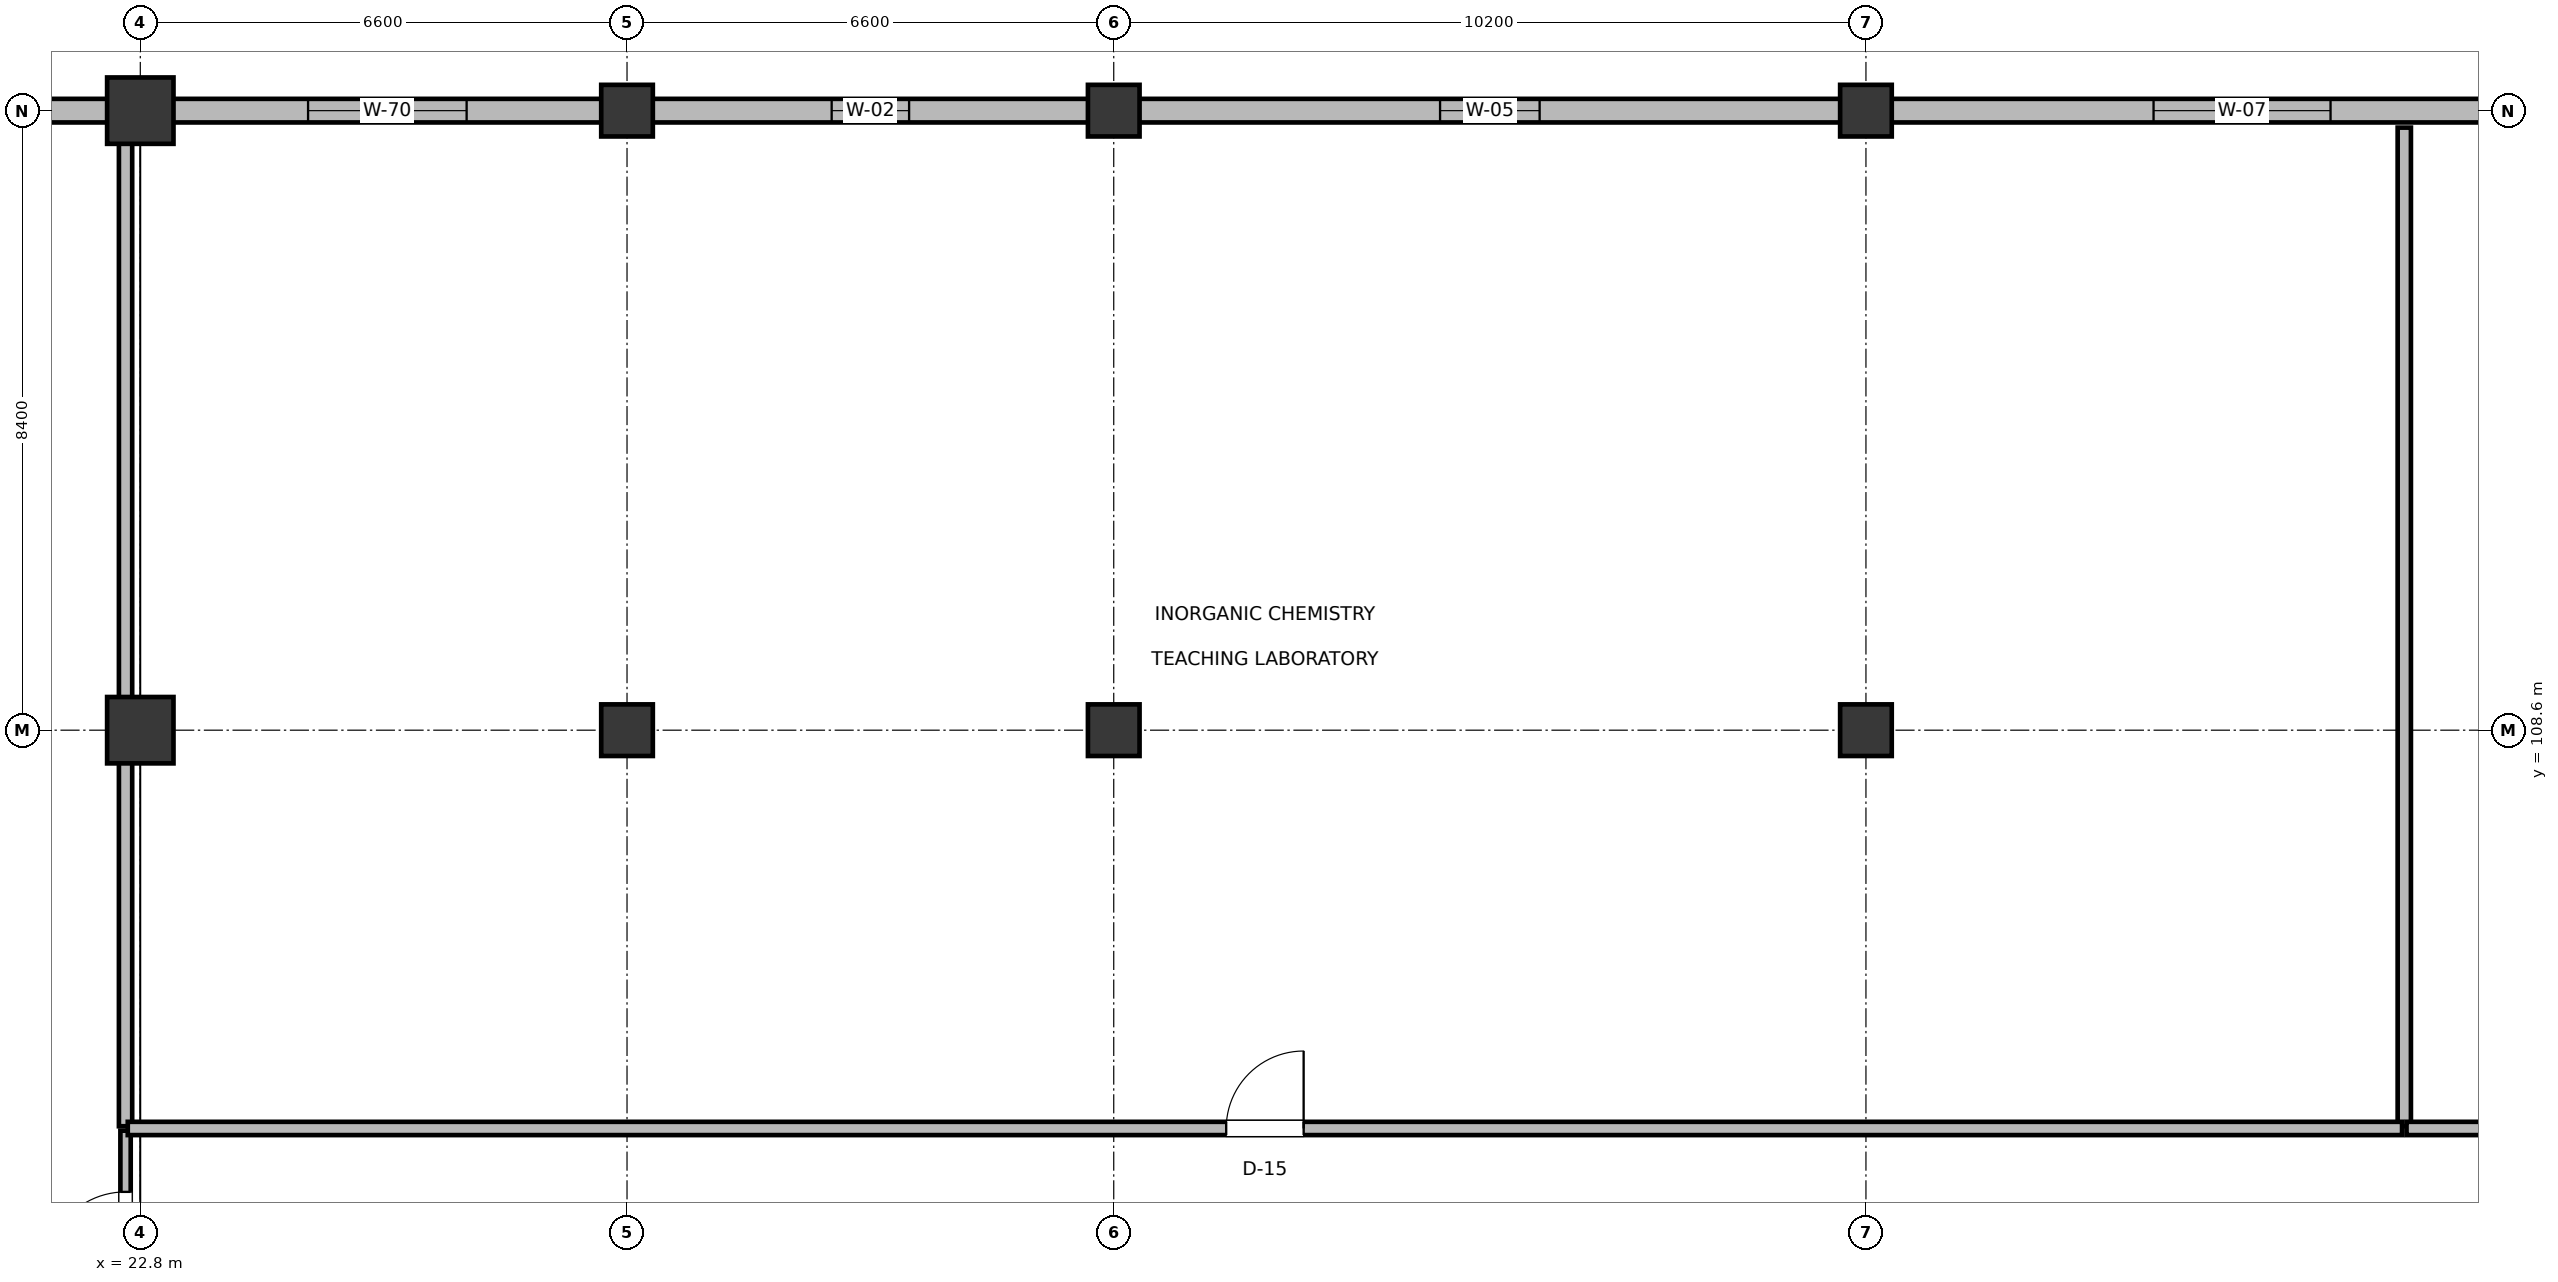
"""IFC4 building model, lengths in metres.
Left out: names, types, materials, properties, quantities, classifications, styles, units other than length and angle.
Written with IfcOpenShell. Run it as: python <this file> out.ifc"""

import sys

from ifc_helpers import new_model, si_unit, direction, frame, frame_2d, origin, origin_2d, place, context, subcontext, project, spatial, rectangle, extrude, element, fill, save


model = new_model("IFC4")
c1 = context("Model", 3, precision=1e-05, world=origin(), true_north=direction((0.0, 1.0)))
c2 = subcontext(c1, "Body", "Model", "MODEL_VIEW")
j1 = project(units=[si_unit("LENGTHUNIT", "METRE"), si_unit("PLANEANGLEUNIT", "RADIAN")], contexts=[c1])
p1 = place(None, origin())
s1 = spatial("IfcSite", under=j1, at=p1, CompositionType="ELEMENT")
p2 = place(p1, origin())
s2 = spatial("IfcBuilding", under=s1, at=p2, CompositionType="ELEMENT")
p3 = place(p2, frame((0.0, 0.0, 5.4)))
s3 = spatial("IfcBuildingStorey", under=s2, at=p3, CompositionType="ELEMENT", Elevation=5.4)
for number, where, z_axis, x_axis in (
    (1, (22.8, 108.6, 0.0), (0.0, 0.0, 1.0), (1.0, 0.0, 0.0)),
    (2, (22.8, 117.0, 0.0), (0.0, 0.0, 1.0), (1.0, 0.0, 0.0)),
):
    element("IfcColumn", number, at=place(p3, frame(where, z_axis=z_axis, x_axis=x_axis)), inside=s3, PredefinedType="COLUMN", context=c2, shape_type="SweptSolid", body=[
        extrude(rectangle(XDim=0.9, YDim=0.9, at=origin_2d()), origin(), (0.0, 0.0, 1.0), 4.8),
    ])
for number, where, z_axis, x_axis in (
    (3, (29.4, 108.6, 0.0), (0.0, 0.0, 1.0), (1.0, 0.0, 0.0)),
    (4, (29.4, 117.0, 0.0), (0.0, 0.0, 1.0), (1.0, 0.0, 0.0)),
    (5, (36.0, 108.6, 0.0), (0.0, 0.0, 1.0), (1.0, 0.0, 0.0)),
    (6, (36.0, 117.0, 0.0), (0.0, 0.0, 1.0), (1.0, 0.0, 0.0)),
    (7, (46.2, 108.6, 0.0), (0.0, 0.0, 1.0), (1.0, 0.0, 0.0)),
    (8, (46.2, 117.0, 0.0), (0.0, 0.0, 1.0), (1.0, 0.0, 0.0)),
):
    element("IfcColumn", number, at=place(p3, frame(where, z_axis=z_axis, x_axis=x_axis)), inside=s3, PredefinedType="COLUMN", context=c2, shape_type="SweptSolid", body=[
        extrude(rectangle(XDim=0.7, YDim=0.7, at=origin_2d()), origin(), (0.0, 0.0, 1.0), 4.8),
    ])
p4 = place(p3, frame((3.435, 117.0, 0.0), z_axis=(0.0, 0.0, 1.0), x_axis=(1.0, 0.0, 0.0)))
e9 = element("IfcWall", 9, at=p4, inside=s3, PredefinedType="SOLIDWALL", context=c2, shape_type="SweptSolid", body=[
    extrude(rectangle(XDim=18.93, YDim=0.32, at=frame_2d((9.465, 0.0))), origin(), (0.0, 0.0, 1.0), 3.775),
])
p5 = place(p4, frame((8.39, 0.0, 0.95)))
e10 = element("IfcOpeningElement", 10, at=p5, cuts=e9, PredefinedType="OPENING", context=c2, shape_type="SweptSolid", body=[
    extrude(rectangle(XDim=2.15, YDim=1.15, at=frame_2d((1.075, 0.575))), frame((0.0, 0.17, 0.0), z_axis=(0.0, -1.0, 0.0), x_axis=(1.0, 0.0, 0.0)), (0.0, 0.0, 1.0), 0.34),
])
p6 = place(p3, frame((23.235, 117.0, 0.0), z_axis=(0.0, 0.0, 1.0), x_axis=(1.0, 0.0, 0.0)))
e11 = element("IfcWall", 11, at=p6, inside=s3, PredefinedType="SOLIDWALL", context=c2, shape_type="SweptSolid", body=[
    extrude(rectangle(XDim=5.83, YDim=0.32, at=frame_2d((2.915, 0.0))), origin(), (0.0, 0.0, 1.0), 3.845),
])
p7 = place(p6, frame((1.84, 0.0, 0.9)))
e12 = element("IfcOpeningElement", 12, at=p7, cuts=e11, PredefinedType="OPENING", context=c2, shape_type="SweptSolid", body=[
    extrude(rectangle(XDim=2.15, YDim=1.35, at=frame_2d((1.075, 0.675))), frame((0.0, 0.17, 0.0), z_axis=(0.0, -1.0, 0.0), x_axis=(1.0, 0.0, 0.0)), (0.0, 0.0, 1.0), 0.34),
])
p8 = place(p3, frame((29.735, 117.0, 0.0), z_axis=(0.0, 0.0, 1.0), x_axis=(1.0, 0.0, 0.0)))
e13 = element("IfcWall", 13, at=p8, inside=s3, PredefinedType="SOLIDWALL", context=c2, shape_type="SweptSolid", body=[
    extrude(rectangle(XDim=5.93, YDim=0.32, at=frame_2d((2.965, 0.0))), origin(), (0.0, 0.0, 1.0), 3.845),
])
p9 = place(p8, frame((2.44, 0.0, 0.9)))
e14 = element("IfcOpeningElement", 14, at=p9, cuts=e13, PredefinedType="OPENING", context=c2, shape_type="SweptSolid", body=[
    extrude(rectangle(XDim=1.05, YDim=1.8, at=frame_2d((0.525, 0.9))), frame((0.0, 0.17, 0.0), z_axis=(0.0, -1.0, 0.0), x_axis=(1.0, 0.0, 0.0)), (0.0, 0.0, 1.0), 0.34),
])
p10 = place(p3, frame((36.335, 117.0, 0.0), z_axis=(0.0, 0.0, 1.0), x_axis=(1.0, 0.0, 0.0)))
e15 = element("IfcWall", 15, at=p10, inside=s3, PredefinedType="SOLIDWALL", context=c2, shape_type="SweptSolid", body=[
    extrude(rectangle(XDim=9.53, YDim=0.32, at=frame_2d((4.765, 0.0))), origin(), (0.0, 0.0, 1.0), 3.845),
])
p11 = place(p10, frame((4.09, 0.0, 0.9)))
e16 = element("IfcOpeningElement", 16, at=p11, cuts=e15, PredefinedType="OPENING", context=c2, shape_type="SweptSolid", body=[
    extrude(rectangle(XDim=1.35, YDim=1.85, at=frame_2d((0.675, 0.925))), frame((0.0, 0.17, 0.0), z_axis=(0.0, -1.0, 0.0), x_axis=(1.0, 0.0, 0.0)), (0.0, 0.0, 1.0), 0.34),
])
p12 = place(p3, frame((46.535, 117.0, 0.0), z_axis=(0.0, 0.0, 1.0), x_axis=(1.0, 0.0, 0.0)))
e17 = element("IfcWall", 17, at=p12, inside=s3, PredefinedType="SOLIDWALL", context=c2, shape_type="SweptSolid", body=[
    extrude(rectangle(XDim=9.53, YDim=0.32, at=frame_2d((4.765, 0.0))), origin(), (0.0, 0.0, 1.0), 3.845),
])
p13 = place(p12, frame((3.565, 0.0, 0.9)))
e18 = element("IfcOpeningElement", 18, at=p13, cuts=e17, PredefinedType="OPENING", context=c2, shape_type="SweptSolid", body=[
    extrude(rectangle(XDim=2.4, YDim=1.95, at=frame_2d((1.2, 0.975))), frame((0.0, 0.17, 0.0), z_axis=(0.0, -1.0, 0.0), x_axis=(1.0, 0.0, 0.0)), (0.0, 0.0, 1.0), 0.34),
])
p14 = place(p3, frame((22.6, 103.23, 0.0), z_axis=(0.0, 0.0, 1.0), x_axis=(0.0, 1.0, 0.0)))
e19 = element("IfcWall", 19, at=p14, inside=s3, PredefinedType="PARTITIONING", context=c2, shape_type="SweptSolid", body=[
    extrude(rectangle(XDim=13.54, YDim=0.18, at=frame_2d((6.77, 0.0))), origin(), (0.0, 0.0, 1.0), 3.825),
])
p15 = place(p3, frame((22.6, 100.43, 0.0), z_axis=(0.0, 0.0, 1.0), x_axis=(0.0, 1.0, 0.0)))
e20 = element("IfcWall", 20, at=p15, inside=s3, PredefinedType="PARTITIONING", context=c2, shape_type="SweptSolid", body=[
    extrude(rectangle(XDim=2.74, YDim=0.14, at=frame_2d((1.37, 0.0))), origin(), (0.0, 0.0, 1.0), 3.825),
])
p16 = place(p15, frame((0.83, 0.0, 0.0)))
e21 = element("IfcOpeningElement", 21, at=p16, cuts=e20, PredefinedType="OPENING", context=c2, shape_type="SweptSolid", body=[
    extrude(rectangle(XDim=1.08, YDim=2.15, at=frame_2d((0.54, 1.075))), frame((0.0, 0.08, 0.0), z_axis=(0.0, -1.0, 0.0), x_axis=(1.0, 0.0, 0.0)), (0.0, 0.0, 1.0), 0.16),
])
p17 = place(p3, frame((53.5, 103.23, 0.0), z_axis=(0.0, 0.0, 1.0), x_axis=(0.0, 1.0, 0.0)))
e22 = element("IfcWall", 22, at=p17, inside=s3, PredefinedType="PARTITIONING", context=c2, shape_type="SweptSolid", body=[
    extrude(rectangle(XDim=13.54, YDim=0.18, at=frame_2d((6.77, 0.0))), origin(), (0.0, 0.0, 1.0), 3.795),
])
p18 = place(p3, frame((22.63, 103.2, 0.0), z_axis=(0.0, 0.0, 1.0), x_axis=(1.0, 0.0, 0.0)))
e23 = element("IfcWall", 23, at=p18, inside=s3, PredefinedType="PARTITIONING", context=c2, shape_type="SweptSolid", body=[
    extrude(rectangle(XDim=30.84, YDim=0.18, at=frame_2d((15.42, 0.0))), origin(), (0.0, 0.0, 1.0), 3.825),
])
p19 = place(p18, frame((14.895, 0.0, 0.0)))
e24 = element("IfcOpeningElement", 24, at=p19, cuts=e23, PredefinedType="OPENING", context=c2, shape_type="SweptSolid", body=[
    extrude(rectangle(XDim=1.05, YDim=2.2, at=frame_2d((0.525, 1.1))), frame((0.0, 0.1, 0.0), z_axis=(0.0, -1.0, 0.0), x_axis=(1.0, 0.0, 0.0)), (0.0, 0.0, 1.0), 0.2),
])
p20 = place(p3, frame((53.53, 103.2, 0.0), z_axis=(0.0, 0.0, 1.0), x_axis=(1.0, 0.0, 0.0)))
e25 = element("IfcWall", 25, at=p20, inside=s3, PredefinedType="PARTITIONING", context=c2, shape_type="SweptSolid", body=[
    extrude(rectangle(XDim=16.49, YDim=0.18, at=frame_2d((8.245, 0.0))), origin(), (0.0, 0.0, 1.0), 3.895),
])
p21 = place(p20, frame((7.72, 0.0, 0.0)))
e26 = element("IfcOpeningElement", 26, at=p21, cuts=e25, PredefinedType="OPENING", context=c2, shape_type="SweptSolid", body=[
    extrude(rectangle(XDim=1.05, YDim=2.2, at=frame_2d((0.525, 1.1))), frame((0.0, 0.1, 0.0), z_axis=(0.0, -1.0, 0.0), x_axis=(1.0, 0.0, 0.0)), (0.0, 0.0, 1.0), 0.2),
])
p22 = place(p7, origin())
e27 = element("IfcWindow", 27, at=p22, inside=s3, PartitioningType="DOUBLE_PANEL_VERTICAL", PredefinedType="WINDOW", context=c2, shape_type="SweptSolid", body=[
    extrude(rectangle(XDim=2.15, YDim=1.35, at=frame_2d((1.075, 0.675))), frame((0.0, 0.03, 0.0), z_axis=(0.0, -1.0, 0.0), x_axis=(1.0, 0.0, 0.0)), (0.0, 0.0, 1.0), 0.06),
])
fill(e12, e27)
p23 = place(p9, origin())
e28 = element("IfcWindow", 28, at=p23, inside=s3, PartitioningType="SINGLE_PANEL", PredefinedType="WINDOW", context=c2, shape_type="SweptSolid", body=[
    extrude(rectangle(XDim=1.05, YDim=1.8, at=frame_2d((0.525, 0.9))), frame((0.0, 0.03, 0.0), z_axis=(0.0, -1.0, 0.0), x_axis=(1.0, 0.0, 0.0)), (0.0, 0.0, 1.0), 0.06),
])
fill(e14, e28)
p24 = place(p11, origin())
e29 = element("IfcWindow", 29, at=p24, inside=s3, PartitioningType="DOUBLE_PANEL_VERTICAL", PredefinedType="WINDOW", context=c2, shape_type="SweptSolid", body=[
    extrude(rectangle(XDim=1.35, YDim=1.85, at=frame_2d((0.675, 0.925))), frame((0.0, 0.03, 0.0), z_axis=(0.0, -1.0, 0.0), x_axis=(1.0, 0.0, 0.0)), (0.0, 0.0, 1.0), 0.06),
])
fill(e16, e29)
p25 = place(p13, origin())
e30 = element("IfcWindow", 30, at=p25, inside=s3, PartitioningType="DOUBLE_PANEL_VERTICAL", PredefinedType="WINDOW", context=c2, shape_type="SweptSolid", body=[
    extrude(rectangle(XDim=2.4, YDim=1.95, at=frame_2d((1.2, 0.975))), frame((0.0, 0.03, 0.0), z_axis=(0.0, -1.0, 0.0), x_axis=(1.0, 0.0, 0.0)), (0.0, 0.0, 1.0), 0.06),
])
fill(e18, e30)
p26 = place(p16, origin())
e31 = element("IfcDoor", 31, at=p26, inside=s3, OperationType="SINGLE_SWING_LEFT", PredefinedType="DOOR", context=c2, shape_type="SweptSolid", body=[
    extrude(rectangle(XDim=1.08, YDim=2.15, at=frame_2d((0.54, 1.075))), frame((0.0, 0.025, 0.0), z_axis=(0.0, -1.0, 0.0), x_axis=(1.0, 0.0, 0.0)), (0.0, 0.0, 1.0), 0.05),
])
fill(e21, e31)
p27 = place(p19, origin())
e32 = element("IfcDoor", 32, at=p27, inside=s3, OperationType="SINGLE_SWING_RIGHT", PredefinedType="DOOR", context=c2, shape_type="SweptSolid", body=[
    extrude(rectangle(XDim=1.05, YDim=2.2, at=frame_2d((0.525, 1.1))), frame((0.0, 0.025, 0.0), z_axis=(0.0, -1.0, 0.0), x_axis=(1.0, 0.0, 0.0)), (0.0, 0.0, 1.0), 0.05),
])
fill(e24, e32)
save(model, sys.argv[1])
